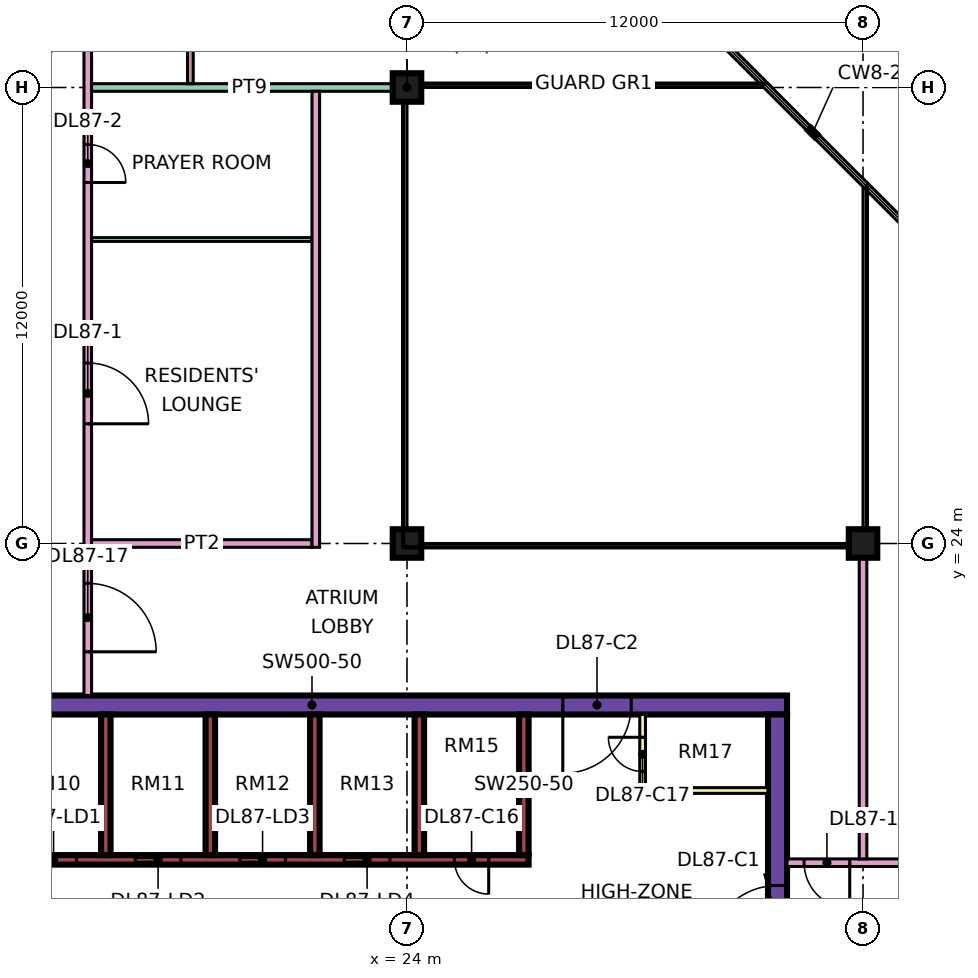
"""IFC4 building model, lengths in metres.
Left out: names, types, materials, properties, quantities, classifications, styles, units other than length and angle.
Written with IfcOpenShell. Run it as: python <this file> out.ifc"""

import sys

from ifc_helpers import new_model, si_unit, direction, frame, frame_2d, origin, origin_2d, place, context, subcontext, project, spatial, rectangle, extrude, element, fill, save


model = new_model("IFC4")
c1 = context("Model", 3, precision=1e-05, world=origin(), true_north=direction((0.0, 1.0)))
c2 = subcontext(c1, "Body", "Model", "MODEL_VIEW")
j1 = project(units=[si_unit("LENGTHUNIT", "METRE"), si_unit("PLANEANGLEUNIT", "RADIAN")], contexts=[c1])
p1 = place(None, origin())
s1 = spatial("IfcSite", under=j1, at=p1, CompositionType="ELEMENT")
p2 = place(p1, origin())
s2 = spatial("IfcBuilding", under=s1, at=p2, CompositionType="ELEMENT")
p3 = place(p2, frame((0.0, 0.0, 372.65)))
s3 = spatial("IfcBuildingStorey", under=s2, at=p3, CompositionType="ELEMENT", Elevation=372.65)
for number, where, z_axis, x_axis in (
    (1, (24.0, 24.0, 0.0), (0.0, 0.0, 1.0), (1.0, 0.0, 0.0)),
    (2, (24.0, 36.0, 0.0), (0.0, 0.0, 1.0), (1.0, 0.0, 0.0)),
    (3, (36.0, 24.0, 0.0), (0.0, 0.0, 1.0), (1.0, 0.0, 0.0)),
):
    element("IfcColumn", number, at=place(p3, frame(where, z_axis=z_axis, x_axis=x_axis)), inside=s3, PredefinedType="COLUMN", context=c2, shape_type="SweptSolid", body=[
        extrude(rectangle(XDim=0.75, YDim=0.75, at=origin_2d()), origin(), (0.0, 0.0, 1.0), 3.75),
    ])
p4 = place(p3, frame((9.0, 19.75, 0.0), z_axis=(0.0, 0.0, 1.0), x_axis=(1.0, 0.0, 0.0)))
e4 = element("IfcWall", 4, at=p4, inside=s3, PredefinedType="SHEAR", context=c2, shape_type="SweptSolid", body=[
    extrude(rectangle(XDim=25.0, YDim=0.5, at=frame_2d((12.5, 0.0))), origin(), (0.0, 0.0, 1.0), 3.75),
])
p5 = place(p4, frame((19.1, 0.0, 0.0)))
e5 = element("IfcOpeningElement", 5, at=p5, cuts=e4, PredefinedType="OPENING", context=c2, shape_type="SweptSolid", body=[
    extrude(rectangle(XDim=1.8, YDim=2.4, at=frame_2d((0.9, 1.2))), frame((0.0, 0.26, 0.0), z_axis=(0.0, -1.0, 0.0), x_axis=(1.0, 0.0, 0.0)), (0.0, 0.0, 1.0), 0.52),
])
p6 = place(p3, frame((33.75, 7.5, 0.0), z_axis=(0.0, 0.0, 1.0), x_axis=(0.0, 1.0, 0.0)))
e6 = element("IfcWall", 6, at=p6, inside=s3, PredefinedType="SHEAR", context=c2, shape_type="SweptSolid", body=[
    extrude(rectangle(XDim=12.0, YDim=0.5, at=frame_2d((6.0, 0.0))), origin(), (0.0, 0.0, 1.0), 3.75),
])
p7 = place(p6, frame((5.7, 0.0, 0.0)))
e7 = element("IfcOpeningElement", 7, at=p7, cuts=e6, PredefinedType="OPENING", context=c2, shape_type="SweptSolid", body=[
    extrude(rectangle(XDim=1.8, YDim=2.4, at=frame_2d((0.9, 1.2))), frame((0.0, 0.26, 0.0), z_axis=(0.0, -1.0, 0.0), x_axis=(1.0, 0.0, 0.0)), (0.0, 0.0, 1.0), 0.52),
])
p8 = place(p3, frame((13.45, 15.675, 0.0), z_axis=(0.0, 0.0, 1.0), x_axis=(1.0, 0.0, 0.0)))
e8 = element("IfcWall", 8, at=p8, inside=s3, PredefinedType="SHEAR", context=c2, shape_type="SweptSolid", body=[
    extrude(rectangle(XDim=13.75, YDim=0.25, at=frame_2d((6.875, 0.0))), origin(), (0.0, 0.0, 1.0), 3.75),
])
p9 = place(p8, frame((0.65, 0.0, 0.0)))
e9 = element("IfcOpeningElement", 9, at=p9, cuts=e8, PredefinedType="OPENING", context=c2, shape_type="SweptSolid", body=[
    extrude(rectangle(XDim=1.2, YDim=2.2, at=frame_2d((0.6, 1.1))), frame((0.0, 0.135, 0.0), z_axis=(0.0, -1.0, 0.0), x_axis=(1.0, 0.0, 0.0)), (0.0, 0.0, 1.0), 0.27),
])
p10 = place(p8, frame((3.4, 0.0, 0.0)))
e10 = element("IfcOpeningElement", 10, at=p10, cuts=e8, PredefinedType="OPENING", context=c2, shape_type="SweptSolid", body=[
    extrude(rectangle(XDim=1.2, YDim=2.2, at=frame_2d((0.6, 1.1))), frame((0.0, 0.135, 0.0), z_axis=(0.0, -1.0, 0.0), x_axis=(1.0, 0.0, 0.0)), (0.0, 0.0, 1.0), 0.27),
])
p11 = place(p8, frame((6.15, 0.0, 0.0)))
e11 = element("IfcOpeningElement", 11, at=p11, cuts=e8, PredefinedType="OPENING", context=c2, shape_type="SweptSolid", body=[
    extrude(rectangle(XDim=1.2, YDim=2.2, at=frame_2d((0.6, 1.1))), frame((0.0, 0.135, 0.0), z_axis=(0.0, -1.0, 0.0), x_axis=(1.0, 0.0, 0.0)), (0.0, 0.0, 1.0), 0.27),
])
p12 = place(p8, frame((8.9, 0.0, 0.0)))
e12 = element("IfcOpeningElement", 12, at=p12, cuts=e8, PredefinedType="OPENING", context=c2, shape_type="SweptSolid", body=[
    extrude(rectangle(XDim=1.2, YDim=2.2, at=frame_2d((0.6, 1.1))), frame((0.0, 0.135, 0.0), z_axis=(0.0, -1.0, 0.0), x_axis=(1.0, 0.0, 0.0)), (0.0, 0.0, 1.0), 0.27),
])
p13 = place(p8, frame((11.8, 0.0, 0.0)))
e13 = element("IfcOpeningElement", 13, at=p13, cuts=e8, PredefinedType="OPENING", context=c2, shape_type="SweptSolid", body=[
    extrude(rectangle(XDim=0.9, YDim=2.1, at=frame_2d((0.45, 1.05))), frame((0.0, 0.135, 0.0), z_axis=(0.0, -1.0, 0.0), x_axis=(1.0, 0.0, 0.0)), (0.0, 0.0, 1.0), 0.27),
])
for number, where, z_axis, x_axis in (
    (14, (16.075, 15.8, 0.0), (0.0, 0.0, 1.0), (0.0, 1.0, 0.0)),
    (15, (18.825, 15.8, 0.0), (0.0, 0.0, 1.0), (0.0, 1.0, 0.0)),
    (16, (21.575, 15.8, 0.0), (0.0, 0.0, 1.0), (0.0, 1.0, 0.0)),
    (17, (24.325, 15.8, 0.0), (0.0, 0.0, 1.0), (0.0, 1.0, 0.0)),
    (18, (27.075, 15.8, 0.0), (0.0, 0.0, 1.0), (0.0, 1.0, 0.0)),
):
    element("IfcWall", number, at=place(p3, frame(where, z_axis=z_axis, x_axis=x_axis)), inside=s3, PredefinedType="SHEAR", context=c2, shape_type="SweptSolid", body=[
        extrude(rectangle(XDim=3.7, YDim=0.25, at=frame_2d((1.85, 0.0))), origin(), (0.0, 0.0, 1.0), 3.75),
    ])
p14 = place(p3, frame((30.2, 17.5, 0.0), z_axis=(0.0, 0.0, 1.0), x_axis=(0.0, 1.0, 0.0)))
e19 = element("IfcWall", 19, at=p14, inside=s3, PredefinedType="PARTITIONING", context=c2, shape_type="SweptSolid", body=[
    extrude(rectangle(XDim=2.0, YDim=0.15, at=frame_2d((1.0, 0.0))), origin(), (0.0, 0.0, 1.0), 3.35),
])
p15 = place(p14, frame((0.5, 0.0, 0.0)))
e20 = element("IfcOpeningElement", 20, at=p15, cuts=e19, PredefinedType="OPENING", context=c2, shape_type="SweptSolid", body=[
    extrude(rectangle(XDim=0.9, YDim=2.1, at=frame_2d((0.45, 1.05))), frame((0.0, 0.085, 0.0), z_axis=(0.0, -1.0, 0.0), x_axis=(1.0, 0.0, 0.0)), (0.0, 0.0, 1.0), 0.17),
])
p16 = place(p3, frame((30.2, 17.5, 0.0), z_axis=(0.0, 0.0, 1.0), x_axis=(1.0, 0.0, 0.0)))
e21 = element("IfcWall", 21, at=p16, inside=s3, PredefinedType="PARTITIONING", context=c2, shape_type="SweptSolid", body=[
    extrude(rectangle(XDim=3.3, YDim=0.15, at=frame_2d((1.65, 0.0))), origin(), (0.0, 0.0, 1.0), 3.35),
])
p17 = place(p3, frame((15.6, 20.0, 0.0), z_axis=(0.0, 0.0, 1.0), x_axis=(0.0, 1.0, 0.0)))
e22 = element("IfcWall", 22, at=p17, inside=s3, PredefinedType="PARTITIONING", context=c2, shape_type="SweptSolid", body=[
    extrude(rectangle(XDim=27.775, YDim=0.2, at=frame_2d((13.887, 0.0))), origin(), (0.0, 0.0, 1.0), 3.35),
])
p18 = place(p17, frame((7.15, 0.0, 0.0)))
e23 = element("IfcOpeningElement", 23, at=p18, cuts=e22, PredefinedType="OPENING", context=c2, shape_type="SweptSolid", body=[
    extrude(rectangle(XDim=1.6, YDim=2.1, at=frame_2d((0.8, 1.05))), frame((0.0, 0.11, 0.0), z_axis=(0.0, -1.0, 0.0), x_axis=(1.0, 0.0, 0.0)), (0.0, 0.0, 1.0), 0.22),
])
p19 = place(p17, frame((13.5, 0.0, 0.0)))
e24 = element("IfcOpeningElement", 24, at=p19, cuts=e22, PredefinedType="OPENING", context=c2, shape_type="SweptSolid", body=[
    extrude(rectangle(XDim=1.0, YDim=2.1, at=frame_2d((0.5, 1.05))), frame((0.0, 0.11, 0.0), z_axis=(0.0, -1.0, 0.0), x_axis=(1.0, 0.0, 0.0)), (0.0, 0.0, 1.0), 0.22),
])
p20 = place(p17, frame((23.35, 0.0, 0.0)))
e25 = element("IfcOpeningElement", 25, at=p20, cuts=e22, PredefinedType="OPENING", context=c2, shape_type="SweptSolid", body=[
    extrude(rectangle(XDim=1.0, YDim=2.1, at=frame_2d((0.5, 1.05))), frame((0.0, 0.11, 0.0), z_axis=(0.0, -1.0, 0.0), x_axis=(1.0, 0.0, 0.0)), (0.0, 0.0, 1.0), 0.22),
])
p21 = place(p17, frame((1.15, 0.0, 0.0)))
e26 = element("IfcOpeningElement", 26, at=p21, cuts=e22, PredefinedType="OPENING", context=c2, shape_type="SweptSolid", body=[
    extrude(rectangle(XDim=1.8, YDim=2.1, at=frame_2d((0.9, 1.05))), frame((0.0, 0.11, 0.0), z_axis=(0.0, -1.0, 0.0), x_axis=(1.0, 0.0, 0.0)), (0.0, 0.0, 1.0), 0.22),
])
p22 = place(p17, frame((25.9, 0.0, 0.0)))
e27 = element("IfcOpeningElement", 27, at=p22, cuts=e22, PredefinedType="OPENING", context=c2, shape_type="SweptSolid", body=[
    extrude(rectangle(XDim=1.0, YDim=2.1, at=frame_2d((0.5, 1.05))), frame((0.0, 0.11, 0.0), z_axis=(0.0, -1.0, 0.0), x_axis=(1.0, 0.0, 0.0)), (0.0, 0.0, 1.0), 0.22),
])
p23 = place(p3, frame((15.7, 24.0, 0.0), z_axis=(0.0, 0.0, 1.0), x_axis=(1.0, 0.0, 0.0)))
e28 = element("IfcWall", 28, at=p23, inside=s3, PredefinedType="PARTITIONING", context=c2, shape_type="SweptSolid", body=[
    extrude(rectangle(XDim=5.8, YDim=0.2, at=frame_2d((2.9, 0.0))), origin(), (0.0, 0.0, 1.0), 3.35),
])
p24 = place(p3, frame((15.7, 32.0, 0.0), z_axis=(0.0, 0.0, 1.0), x_axis=(1.0, 0.0, 0.0)))
e29 = element("IfcWall", 29, at=p24, inside=s3, PredefinedType="PARTITIONING", context=c2, shape_type="SweptSolid", body=[
    extrude(rectangle(XDim=5.8, YDim=0.1, at=frame_2d((2.9, 0.0))), origin(), (0.0, 0.0, 1.0), 3.35),
])
p25 = place(p3, frame((15.7, 36.0, 0.0), z_axis=(0.0, 0.0, 1.0), x_axis=(1.0, 0.0, 0.0)))
e30 = element("IfcWall", 30, at=p25, inside=s3, PredefinedType="PARTITIONING", context=c2, shape_type="SweptSolid", body=[
    extrude(rectangle(XDim=8.3, YDim=0.2, at=frame_2d((4.15, 0.0))), origin(), (0.0, 0.0, 1.0), 3.35),
])
p26 = place(p3, frame((18.3, 36.1, 0.0), z_axis=(0.0, 0.0, 1.0), x_axis=(0.0, 1.0, 0.0)))
e31 = element("IfcWall", 31, at=p26, inside=s3, PredefinedType="PARTITIONING", context=c2, shape_type="SweptSolid", body=[
    extrude(rectangle(XDim=6.575, YDim=0.15, at=frame_2d((3.288, 0.0))), origin(), (0.0, 0.0, 1.0), 3.35),
])
p27 = place(p26, frame((1.1, 0.0, 0.0)))
e32 = element("IfcOpeningElement", 32, at=p27, cuts=e31, PredefinedType="OPENING", context=c2, shape_type="SweptSolid", body=[
    extrude(rectangle(XDim=0.9, YDim=2.1, at=frame_2d((0.45, 1.05))), frame((0.0, 0.085, 0.0), z_axis=(0.0, -1.0, 0.0), x_axis=(1.0, 0.0, 0.0)), (0.0, 0.0, 1.0), 0.17),
])
p28 = place(p3, frame((21.6, 23.9, 0.0), z_axis=(0.0, 0.0, 1.0), x_axis=(0.0, 1.0, 0.0)))
e33 = element("IfcWall", 33, at=p28, inside=s3, PredefinedType="PARTITIONING", context=c2, shape_type="SweptSolid", body=[
    extrude(rectangle(XDim=12.0, YDim=0.2, at=frame_2d((6.0, 0.0))), origin(), (0.0, 0.0, 1.0), 3.35),
])
p29 = place(p3, frame((34.0, 15.6, 0.0), z_axis=(0.0, 0.0, 1.0), x_axis=(1.0, 0.0, 0.0)))
e34 = element("IfcWall", 34, at=p29, inside=s3, PredefinedType="PARTITIONING", context=c2, shape_type="SweptSolid", body=[
    extrude(rectangle(XDim=10.35, YDim=0.2, at=frame_2d((5.175, 0.0))), origin(), (0.0, 0.0, 1.0), 3.35),
])
p30 = place(p29, frame((5.6, 0.0, 0.0)))
e35 = element("IfcOpeningElement", 35, at=p30, cuts=e34, PredefinedType="OPENING", context=c2, shape_type="SweptSolid", body=[
    extrude(rectangle(XDim=1.0, YDim=2.1, at=frame_2d((0.5, 1.05))), frame((0.0, 0.11, 0.0), z_axis=(0.0, -1.0, 0.0), x_axis=(1.0, 0.0, 0.0)), (0.0, 0.0, 1.0), 0.22),
])
p31 = place(p29, frame((0.45, 0.0, 0.0)))
e36 = element("IfcOpeningElement", 36, at=p31, cuts=e34, PredefinedType="OPENING", context=c2, shape_type="SweptSolid", body=[
    extrude(rectangle(XDim=1.2, YDim=2.1, at=frame_2d((0.6, 1.05))), frame((0.0, 0.11, 0.0), z_axis=(0.0, -1.0, 0.0), x_axis=(1.0, 0.0, 0.0)), (0.0, 0.0, 1.0), 0.22),
])
p32 = place(p3, frame((36.0, 15.7, 0.0), z_axis=(0.0, 0.0, 1.0), x_axis=(0.0, 1.0, 0.0)))
e37 = element("IfcWall", 37, at=p32, inside=s3, PredefinedType="PARTITIONING", context=c2, shape_type="SweptSolid", body=[
    extrude(rectangle(XDim=8.3, YDim=0.2, at=frame_2d((4.15, 0.0))), origin(), (0.0, 0.0, 1.0), 3.35),
])
p33 = place(p9, origin())
e38 = element("IfcDoor", 38, at=p33, inside=s3, OperationType="DOUBLE_DOOR_SLIDING", PredefinedType="DOOR", context=c2, shape_type="SweptSolid", body=[
    extrude(rectangle(XDim=1.2, YDim=2.2, at=frame_2d((0.6, 1.1))), frame((0.0, 0.025, 0.0), z_axis=(0.0, -1.0, 0.0), x_axis=(1.0, 0.0, 0.0)), (0.0, 0.0, 1.0), 0.05),
])
fill(e9, e38)
p34 = place(p10, origin())
e39 = element("IfcDoor", 39, at=p34, inside=s3, OperationType="DOUBLE_DOOR_SLIDING", PredefinedType="DOOR", context=c2, shape_type="SweptSolid", body=[
    extrude(rectangle(XDim=1.2, YDim=2.2, at=frame_2d((0.6, 1.1))), frame((0.0, 0.025, 0.0), z_axis=(0.0, -1.0, 0.0), x_axis=(1.0, 0.0, 0.0)), (0.0, 0.0, 1.0), 0.05),
])
fill(e10, e39)
p35 = place(p11, origin())
e40 = element("IfcDoor", 40, at=p35, inside=s3, OperationType="DOUBLE_DOOR_SLIDING", PredefinedType="DOOR", context=c2, shape_type="SweptSolid", body=[
    extrude(rectangle(XDim=1.2, YDim=2.2, at=frame_2d((0.6, 1.1))), frame((0.0, 0.025, 0.0), z_axis=(0.0, -1.0, 0.0), x_axis=(1.0, 0.0, 0.0)), (0.0, 0.0, 1.0), 0.05),
])
fill(e11, e40)
p36 = place(p12, origin())
e41 = element("IfcDoor", 41, at=p36, inside=s3, OperationType="DOUBLE_DOOR_SLIDING", PredefinedType="DOOR", context=c2, shape_type="SweptSolid", body=[
    extrude(rectangle(XDim=1.2, YDim=2.2, at=frame_2d((0.6, 1.1))), frame((0.0, 0.025, 0.0), z_axis=(0.0, -1.0, 0.0), x_axis=(1.0, 0.0, 0.0)), (0.0, 0.0, 1.0), 0.05),
])
fill(e12, e41)
p37 = place(p7, origin())
e42 = element("IfcDoor", 42, at=p37, inside=s3, OperationType="DOUBLE_DOOR_SINGLE_SWING", PredefinedType="DOOR", context=c2, shape_type="SweptSolid", body=[
    extrude(rectangle(XDim=1.8, YDim=2.4, at=frame_2d((0.9, 1.2))), frame((0.0, 0.025, 0.0), z_axis=(0.0, -1.0, 0.0), x_axis=(1.0, 0.0, 0.0)), (0.0, 0.0, 1.0), 0.05),
])
fill(e7, e42)
p38 = place(p5, frame((1.8, 0.0, 0.0), z_axis=(0.0, 0.0, 1.0), x_axis=(-1.0, 0.0, 0.0)))
e43 = element("IfcDoor", 43, at=p38, inside=s3, OperationType="DOUBLE_DOOR_SINGLE_SWING", PredefinedType="DOOR", context=c2, shape_type="SweptSolid", body=[
    extrude(rectangle(XDim=1.8, YDim=2.4, at=frame_2d((0.9, 1.2))), frame((0.0, 0.025, 0.0), z_axis=(0.0, -1.0, 0.0), x_axis=(1.0, 0.0, 0.0)), (0.0, 0.0, 1.0), 0.05),
])
fill(e5, e43)
p39 = place(p13, origin())
e44 = element("IfcDoor", 44, at=p39, inside=s3, OperationType="SINGLE_SWING_RIGHT", PredefinedType="DOOR", context=c2, shape_type="SweptSolid", body=[
    extrude(rectangle(XDim=0.9, YDim=2.1, at=frame_2d((0.45, 1.05))), frame((0.0, 0.025, 0.0), z_axis=(0.0, -1.0, 0.0), x_axis=(1.0, 0.0, 0.0)), (0.0, 0.0, 1.0), 0.05),
])
fill(e13, e44)
p40 = place(p15, frame((0.9, 0.0, 0.0), z_axis=(0.0, 0.0, 1.0), x_axis=(-1.0, 0.0, 0.0)))
e45 = element("IfcDoor", 45, at=p40, inside=s3, OperationType="SINGLE_SWING_RIGHT", PredefinedType="DOOR", context=c2, shape_type="SweptSolid", body=[
    extrude(rectangle(XDim=0.9, YDim=2.1, at=frame_2d((0.45, 1.05))), frame((0.0, 0.025, 0.0), z_axis=(0.0, -1.0, 0.0), x_axis=(1.0, 0.0, 0.0)), (0.0, 0.0, 1.0), 0.05),
])
fill(e20, e45)
p41 = place(p18, frame((1.6, 0.0, 0.0), z_axis=(0.0, 0.0, 1.0), x_axis=(-1.0, 0.0, 0.0)))
e46 = element("IfcDoor", 46, at=p41, inside=s3, OperationType="DOUBLE_DOOR_SINGLE_SWING", PredefinedType="DOOR", context=c2, shape_type="SweptSolid", body=[
    extrude(rectangle(XDim=1.6, YDim=2.1, at=frame_2d((0.8, 1.05))), frame((0.0, 0.025, 0.0), z_axis=(0.0, -1.0, 0.0), x_axis=(1.0, 0.0, 0.0)), (0.0, 0.0, 1.0), 0.05),
])
fill(e23, e46)
p42 = place(p19, frame((1.0, 0.0, 0.0), z_axis=(0.0, 0.0, 1.0), x_axis=(-1.0, 0.0, 0.0)))
e47 = element("IfcDoor", 47, at=p42, inside=s3, OperationType="SINGLE_SWING_LEFT", PredefinedType="DOOR", context=c2, shape_type="SweptSolid", body=[
    extrude(rectangle(XDim=1.0, YDim=2.1, at=frame_2d((0.5, 1.05))), frame((0.0, 0.025, 0.0), z_axis=(0.0, -1.0, 0.0), x_axis=(1.0, 0.0, 0.0)), (0.0, 0.0, 1.0), 0.05),
])
fill(e24, e47)
p43 = place(p31, origin())
e48 = element("IfcDoor", 48, at=p43, inside=s3, OperationType="SINGLE_SWING_RIGHT", PredefinedType="DOOR", context=c2, shape_type="SweptSolid", body=[
    extrude(rectangle(XDim=1.2, YDim=2.1, at=frame_2d((0.6, 1.05))), frame((0.0, 0.025, 0.0), z_axis=(0.0, -1.0, 0.0), x_axis=(1.0, 0.0, 0.0)), (0.0, 0.0, 1.0), 0.05),
])
fill(e36, e48)
p44 = place(p21, frame((1.8, 0.0, 0.0), z_axis=(0.0, 0.0, 1.0), x_axis=(-1.0, 0.0, 0.0)))
e49 = element("IfcDoor", 49, at=p44, inside=s3, OperationType="DOUBLE_DOOR_SINGLE_SWING", PredefinedType="DOOR", context=c2, shape_type="SweptSolid", body=[
    extrude(rectangle(XDim=1.8, YDim=2.1, at=frame_2d((0.9, 1.05))), frame((0.0, 0.025, 0.0), z_axis=(0.0, -1.0, 0.0), x_axis=(1.0, 0.0, 0.0)), (0.0, 0.0, 1.0), 0.05),
])
fill(e26, e49)
save(model, sys.argv[1])
